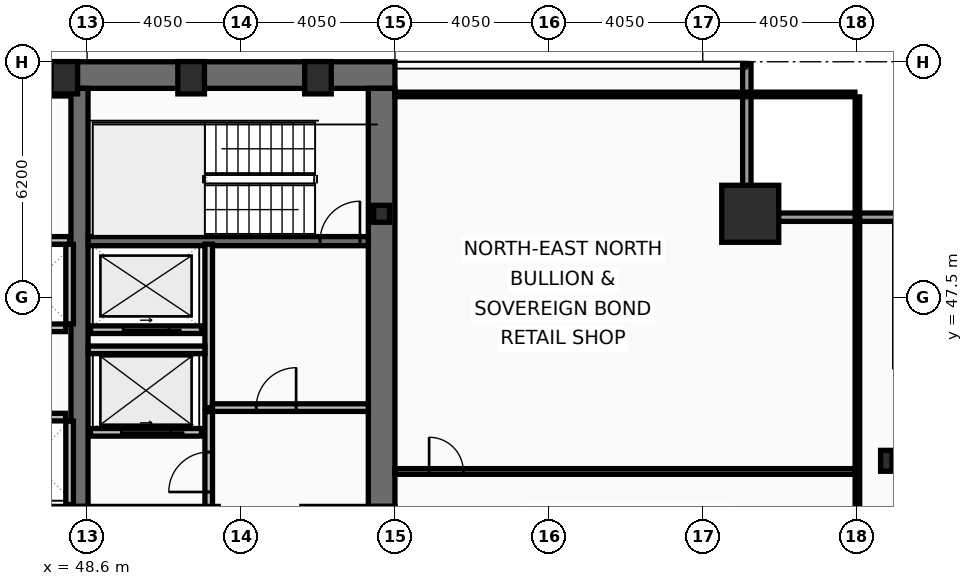
"""IFC4 building model, lengths in metres.
Left out: names, types, materials, properties, quantities, classifications, styles, units other than length and angle.
Written with IfcOpenShell. Run it as: python <this file> out.ifc"""

import sys

from ifc_helpers import new_model, si_unit, direction, frame, frame_2d, origin, origin_2d, place, context, subcontext, project, spatial, rectangle, hollow_rectangle, i_section, extrude, element, fill, save


model = new_model("IFC4")
c1 = context("Model", 3, precision=1e-05, world=origin(), true_north=direction((0.0, 1.0)))
c2 = subcontext(c1, "Body", "Model", "MODEL_VIEW")
j1 = project(units=[si_unit("LENGTHUNIT", "METRE"), si_unit("PLANEANGLEUNIT", "RADIAN")], contexts=[c1])
p1 = place(None, origin())
s1 = spatial("IfcSite", under=j1, at=p1, CompositionType="ELEMENT")
p2 = place(p1, origin())
s2 = spatial("IfcBuilding", under=s1, at=p2, CompositionType="ELEMENT")
p3 = place(p2, frame((0.0, 0.0, 125.4)))
s3 = spatial("IfcBuildingStorey", under=s2, at=p3, CompositionType="ELEMENT", Elevation=125.4)
p4 = place(p3, frame((16.2, 53.35, 0.0), z_axis=(0.0, 0.0, 1.0), x_axis=(1.0, 0.0, 0.0)))
e1 = element("IfcWall", 1, at=p4, inside=s3, PredefinedType="SHEAR", context=c2, shape_type="SweptSolid", body=[
    extrude(rectangle(XDim=40.5, YDim=0.7, at=frame_2d((20.25, 0.0))), origin(), (0.0, 0.0, 1.0), 3.44),
])
p5 = place(p3, frame((56.35, 53.0, 0.0), z_axis=(0.0, 0.0, 1.0), x_axis=(0.0, -1.0, 0.0)))
e2 = element("IfcWall", 2, at=p5, inside=s3, PredefinedType="SHEAR", context=c2, shape_type="SweptSolid", body=[
    extrude(rectangle(XDim=11.0, YDim=0.7, at=frame_2d((5.5, 0.0))), origin(), (0.0, 0.0, 1.0), 3.44),
])
p6 = place(p3, frame((48.4, 42.0, 0.0), z_axis=(0.0, 0.0, 1.0), x_axis=(0.0, 1.0, 0.0)))
e3 = element("IfcWall", 3, at=p6, inside=s3, PredefinedType="SHEAR", context=c2, shape_type="SweptSolid", body=[
    extrude(rectangle(XDim=11.0, YDim=0.45, at=frame_2d((5.5, 0.0))), origin(), (0.0, 0.0, 1.0), 3.44),
])
p7 = place(p3, frame((48.63, 48.98, 0.0), z_axis=(0.0, 0.0, 1.0), x_axis=(1.0, 0.0, 0.0)))
e4 = element("IfcWall", 4, at=p7, inside=s3, PredefinedType="SHEAR", context=c2, shape_type="SweptSolid", body=[
    extrude(rectangle(XDim=7.37, YDim=0.24, at=frame_2d((3.685, 0.0))), origin(), (0.0, 0.0, 1.0), 3.44),
])
p8 = place(p7, frame((6.1, 0.0, 0.0)))
e5 = element("IfcOpeningElement", 5, at=p8, cuts=e4, PredefinedType="OPENING", context=c2, shape_type="SweptSolid", body=[
    extrude(rectangle(XDim=1.05, YDim=2.15, at=frame_2d((0.525, 1.075))), frame((0.0, 0.13, 0.0), z_axis=(0.0, -1.0, 0.0), x_axis=(1.0, 0.0, 0.0)), (0.0, 0.0, 1.0), 0.26),
])
p9 = place(p3, frame((66.05, 49.7, 0.0), z_axis=(0.0, 0.0, 1.0), x_axis=(1.0, 0.0, 0.0)))
e6 = element("IfcColumn", 6, at=p9, inside=s3, PredefinedType="COLUMN", context=c2, shape_type="SweptSolid", body=[
    extrude(hollow_rectangle(XDim=1.5, YDim=1.5, WallThickness=0.07, at=origin_2d()), origin(), (0.0, 0.0, 1.0), 3.6),
])
for number, where, z_axis, x_axis in (
    (7, (48.0, 53.28, 0.0), (0.0, 0.0, 1.0), (1.0, 0.0, 0.0)),
    (8, (51.337, 53.28, 0.0), (0.0, 0.0, 1.0), (1.0, 0.0, 0.0)),
    (9, (54.675, 53.28, 0.0), (0.0, 0.0, 1.0), (1.0, 0.0, 0.0)),
):
    element("IfcColumn", number, at=place(p3, frame(where, z_axis=z_axis, x_axis=x_axis)), inside=s3, PredefinedType="COLUMN", context=c2, shape_type="SweptSolid", body=[
        extrude(hollow_rectangle(XDim=0.7, YDim=0.85, WallThickness=0.05, at=origin_2d()), origin(), (0.0, 0.0, 1.0), 3.6),
    ])
p10 = place(p3, frame((69.63, 43.2, 0.0), z_axis=(0.0, 0.0, 1.0), x_axis=(1.0, 0.0, 0.0)))
e10 = element("IfcColumn", 10, at=p10, inside=s3, PredefinedType="COLUMN", context=c2, shape_type="SweptSolid", body=[
    extrude(i_section(OverallWidth=0.3, OverallDepth=0.55, WebThickness=0.015, FlangeThickness=0.029, at=origin_2d()), origin(), (0.0, 0.0, 1.0), 3.6),
])
p11 = place(p3, frame((56.35, 49.7, 0.0), z_axis=(0.0, 0.0, 1.0), x_axis=(1.0, 0.0, 0.0)))
e11 = element("IfcColumn", 11, at=p11, inside=s3, PredefinedType="COLUMN", context=c2, shape_type="SweptSolid", body=[
    extrude(i_section(OverallWidth=0.416, OverallDepth=0.446, WebThickness=0.039, FlangeThickness=0.063, at=origin_2d()), origin(), (0.0, 0.0, 1.0), 3.6),
])
p12 = place(p3, frame((65.96, 53.63, 0.0), z_axis=(0.0, 0.0, 1.0), x_axis=(0.0, -1.0, 0.0)))
e12 = element("IfcWall", 12, at=p12, inside=s3, PredefinedType="SOLIDWALL", context=c2, shape_type="SweptSolid", body=[
    extrude(rectangle(XDim=3.91, YDim=0.22, at=frame_2d((1.955, 0.0))), origin(), (0.0, 0.0, 1.0), 2.83),
])
p13 = place(p3, frame((65.85, 49.61, 0.0), z_axis=(0.0, 0.0, 1.0), x_axis=(1.0, 0.0, 0.0)))
e13 = element("IfcWall", 13, at=p13, inside=s3, PredefinedType="SOLIDWALL", context=c2, shape_type="SweptSolid", body=[
    extrude(rectangle(XDim=4.22, YDim=0.22, at=frame_2d((2.11, 0.0))), origin(), (0.0, 0.0, 1.0), 2.83),
])
p14 = place(p3, frame((51.61, 43.95, 0.0), z_axis=(0.0, 0.0, 1.0), x_axis=(-1.0, 0.0, 0.0)))
e14 = element("IfcWall", 14, at=p14, inside=s3, PredefinedType="PARTITIONING", context=c2, shape_type="SweptSolid", body=[
    extrude(rectangle(XDim=2.92, YDim=0.2, at=frame_2d((1.46, 0.0))), origin(), (0.0, 0.0, 1.0), 3.44),
])
p15 = place(p14, frame((0.81, 0.0, 0.0)))
e15 = element("IfcOpeningElement", 15, at=p15, cuts=e14, PredefinedType="OPENING", context=c2, shape_type="SweptSolid", body=[
    extrude(rectangle(XDim=1.3, YDim=2.18, at=frame_2d((0.65, 1.09))), frame((0.0, 0.11, 0.0), z_axis=(0.0, -1.0, 0.0), x_axis=(1.0, 0.0, 0.0)), (0.0, 0.0, 1.0), 0.22),
])
p16 = place(p3, frame((51.61, 46.65, 0.0), z_axis=(0.0, 0.0, 1.0), x_axis=(-1.0, 0.0, 0.0)))
e16 = element("IfcWall", 16, at=p16, inside=s3, PredefinedType="PARTITIONING", context=c2, shape_type="SweptSolid", body=[
    extrude(rectangle(XDim=2.92, YDim=0.2, at=frame_2d((1.46, 0.0))), origin(), (0.0, 0.0, 1.0), 3.44),
])
p17 = place(p16, frame((0.86, 0.0, 0.0)))
e17 = element("IfcOpeningElement", 17, at=p17, cuts=e16, PredefinedType="OPENING", context=c2, shape_type="SweptSolid", body=[
    extrude(rectangle(XDim=1.2, YDim=2.18, at=frame_2d((0.6, 1.09))), frame((0.0, 0.11, 0.0), z_axis=(0.0, -1.0, 0.0), x_axis=(1.0, 0.0, 0.0)), (0.0, 0.0, 1.0), 0.22),
])
p18 = place(p3, frame((51.8, 44.6, 0.0), z_axis=(0.0, 0.0, 1.0), x_axis=(0.0, 1.0, 0.0)))
e18 = element("IfcWall", 18, at=p18, inside=s3, PredefinedType="PARTITIONING", context=c2, shape_type="SweptSolid", body=[
    extrude(rectangle(XDim=4.3, YDim=0.2, at=frame_2d((2.15, 0.0))), origin(), (0.0, 0.0, 1.0), 3.44),
])
p19 = place(p3, frame((51.9, 44.6, 0.0), z_axis=(0.0, 0.0, 1.0), x_axis=(1.0, 0.0, 0.0)))
e19 = element("IfcWall", 19, at=p19, inside=s3, PredefinedType="PARTITIONING", context=c2, shape_type="SweptSolid", body=[
    extrude(rectangle(XDim=4.1, YDim=0.2, at=frame_2d((2.05, 0.0))), origin(), (0.0, 0.0, 1.0), 3.44),
])
p20 = place(p19, frame((1.15, 0.0, 0.0)))
e20 = element("IfcOpeningElement", 20, at=p20, cuts=e19, PredefinedType="OPENING", context=c2, shape_type="SweptSolid", body=[
    extrude(rectangle(XDim=1.05, YDim=2.15, at=frame_2d((0.525, 1.075))), frame((0.0, 0.11, 0.0), z_axis=(0.0, -1.0, 0.0), x_axis=(1.0, 0.0, 0.0)), (0.0, 0.0, 1.0), 0.22),
])
p21 = place(p3, frame((48.63, 46.12, 0.0), z_axis=(0.0, 0.0, 1.0), x_axis=(1.0, 0.0, 0.0)))
e21 = element("IfcWall", 21, at=p21, inside=s3, PredefinedType="PARTITIONING", context=c2, shape_type="SweptSolid", body=[
    extrude(rectangle(XDim=3.07, YDim=0.2, at=frame_2d((1.535, 0.0))), origin(), (0.0, 0.0, 1.0), 3.44),
])
p22 = place(p3, frame((51.8, 42.0, 0.0), z_axis=(0.0, 0.0, 1.0), x_axis=(0.0, 1.0, 0.0)))
e22 = element("IfcWall", 22, at=p22, inside=s3, PredefinedType="PARTITIONING", context=c2, shape_type="SweptSolid", body=[
    extrude(rectangle(XDim=2.495, YDim=0.2, at=frame_2d((1.248, 0.0))), origin(), (0.0, 0.0, 1.0), 3.44),
])
p23 = place(p22, frame((0.38, 0.0, 0.0)))
e23 = element("IfcOpeningElement", 23, at=p23, cuts=e22, PredefinedType="OPENING", context=c2, shape_type="SweptSolid", body=[
    extrude(rectangle(XDim=1.05, YDim=2.15, at=frame_2d((0.525, 1.075))), frame((0.0, 0.11, 0.0), z_axis=(0.0, -1.0, 0.0), x_axis=(1.0, 0.0, 0.0)), (0.0, 0.0, 1.0), 0.22),
])
p24 = place(p3, frame((41.825, 46.7, 0.0), z_axis=(0.0, 0.0, 1.0), x_axis=(1.0, 0.0, 0.0)))
e24 = element("IfcWall", 24, at=p24, inside=s3, PredefinedType="PARTITIONING", context=c2, shape_type="SweptSolid", body=[
    extrude(rectangle(XDim=6.21, YDim=0.2, at=frame_2d((3.105, 0.0))), origin(), (0.0, 0.0, 1.0), 3.44),
])
p25 = place(p3, frame((48.14, 46.805, 0.0), z_axis=(0.0, 0.0, 1.0), x_axis=(0.0, 1.0, 0.0)))
e25 = element("IfcWall", 25, at=p25, inside=s3, PredefinedType="PARTITIONING", context=c2, shape_type="SweptSolid", body=[
    extrude(rectangle(XDim=2.09, YDim=0.2, at=frame_2d((1.045, 0.0))), origin(), (0.0, 0.0, 1.0), 3.44),
])
p26 = place(p3, frame((41.825, 44.35, 0.0), z_axis=(0.0, 0.0, 1.0), x_axis=(1.0, 0.0, 0.0)))
e26 = element("IfcWall", 26, at=p26, inside=s3, PredefinedType="PARTITIONING", context=c2, shape_type="SweptSolid", body=[
    extrude(rectangle(XDim=6.21, YDim=0.2, at=frame_2d((3.105, 0.0))), origin(), (0.0, 0.0, 1.0), 3.44),
])
p27 = place(p3, frame((48.14, 42.05, 0.0), z_axis=(0.0, 0.0, 1.0), x_axis=(0.0, 1.0, 0.0)))
e27 = element("IfcWall", 27, at=p27, inside=s3, PredefinedType="PARTITIONING", context=c2, shape_type="SweptSolid", body=[
    extrude(rectangle(XDim=2.195, YDim=0.2, at=frame_2d((1.098, 0.0))), origin(), (0.0, 0.0, 1.0), 3.44),
])
p28 = place(p3, frame((40.58, 52.86, 0.0), z_axis=(0.0, 0.0, 1.0), x_axis=(1.0, 0.0, 0.0)))
e28 = element("IfcWall", 28, at=p28, inside=s3, PredefinedType="PARTITIONING", context=c2, shape_type="SweptSolid", body=[
    extrude(rectangle(XDim=7.56, YDim=0.12, at=frame_2d((3.78, 0.0))), origin(), (0.0, 0.0, 1.0), 3.44),
])
p29 = place(p3, frame((40.58, 49.0, 0.0), z_axis=(0.0, 0.0, 1.0), x_axis=(1.0, 0.0, 0.0)))
e29 = element("IfcWall", 29, at=p29, inside=s3, PredefinedType="PARTITIONING", context=c2, shape_type="SweptSolid", body=[
    extrude(rectangle(XDim=7.56, YDim=0.2, at=frame_2d((3.78, 0.0))), origin(), (0.0, 0.0, 1.0), 3.44),
])
p30 = place(p29, frame((0.16, 0.0, 0.0)))
e30 = element("IfcOpeningElement", 30, at=p30, cuts=e29, PredefinedType="OPENING", context=c2, shape_type="SweptSolid", body=[
    extrude(rectangle(XDim=0.95, YDim=2.1, at=frame_2d((0.475, 1.05))), frame((0.0, 0.11, 0.0), z_axis=(0.0, -1.0, 0.0), x_axis=(1.0, 0.0, 0.0)), (0.0, 0.0, 1.0), 0.22),
])
p31 = place(p3, frame((56.7, 42.92, 0.0), z_axis=(0.0, 0.0, 1.0), x_axis=(1.0, 0.0, 0.0)))
e31 = element("IfcWall", 31, at=p31, inside=s3, PredefinedType="PARTITIONING", context=c2, shape_type="SweptSolid", body=[
    extrude(rectangle(XDim=12.105, YDim=0.15, at=frame_2d((6.052, 0.0))), origin(), (0.0, 0.0, 1.0), 2.73),
])
p32 = place(p31, frame((0.9, 0.0, 0.0)))
e32 = element("IfcOpeningElement", 32, at=p32, cuts=e31, PredefinedType="OPENING", context=c2, shape_type="SweptSolid", body=[
    extrude(rectangle(XDim=0.9, YDim=2.05, at=frame_2d((0.45, 1.025))), frame((0.0, 0.085, 0.0), z_axis=(0.0, -1.0, 0.0), x_axis=(1.0, 0.0, 0.0)), (0.0, 0.0, 1.0), 0.17),
])
p33 = place(p3, frame((68.87, 10.665, 0.0), z_axis=(0.0, 0.0, 1.0), x_axis=(0.0, 1.0, 0.0)))
e33 = element("IfcWall", 33, at=p33, inside=s3, PredefinedType="PARTITIONING", context=c2, shape_type="SweptSolid", body=[
    extrude(rectangle(XDim=42.11, YDim=0.12, at=frame_2d((21.055, 0.0))), origin(), (0.0, 0.0, 1.0), 2.73),
])
p34 = place(p3, frame((56.7, 52.84, 0.0), z_axis=(0.0, 0.0, 1.0), x_axis=(1.0, 0.0, 0.0)))
e34 = element("IfcWall", 34, at=p34, inside=s3, PredefinedType="PARTITIONING", context=c2, shape_type="SweptSolid", body=[
    extrude(rectangle(XDim=12.105, YDim=0.12, at=frame_2d((6.052, 0.0))), origin(), (0.0, 0.0, 1.0), 3.44),
])
p35 = place(p8, origin())
e35 = element("IfcDoor", 35, at=p35, inside=s3, OperationType="SINGLE_SWING_RIGHT", PredefinedType="DOOR", context=c2, shape_type="SweptSolid", body=[
    extrude(rectangle(XDim=1.05, YDim=2.15, at=frame_2d((0.525, 1.075))), frame((0.0, 0.025, 0.0), z_axis=(0.0, -1.0, 0.0), x_axis=(1.0, 0.0, 0.0)), (0.0, 0.0, 1.0), 0.05),
])
fill(e5, e35)
p36 = place(p15, origin())
e36 = element("IfcDoor", 36, at=p36, inside=s3, OperationType="SLIDING_TO_LEFT", PredefinedType="DOOR", context=c2, shape_type="SweptSolid", body=[
    extrude(rectangle(XDim=1.3, YDim=2.18, at=frame_2d((0.65, 1.09))), frame((0.0, 0.025, 0.0), z_axis=(0.0, -1.0, 0.0), x_axis=(1.0, 0.0, 0.0)), (0.0, 0.0, 1.0), 0.05),
])
fill(e15, e36)
p37 = place(p17, origin())
e37 = element("IfcDoor", 37, at=p37, inside=s3, OperationType="SLIDING_TO_LEFT", PredefinedType="DOOR", context=c2, shape_type="SweptSolid", body=[
    extrude(rectangle(XDim=1.2, YDim=2.18, at=frame_2d((0.6, 1.09))), frame((0.0, 0.025, 0.0), z_axis=(0.0, -1.0, 0.0), x_axis=(1.0, 0.0, 0.0)), (0.0, 0.0, 1.0), 0.05),
])
fill(e17, e37)
p38 = place(p20, origin())
e38 = element("IfcDoor", 38, at=p38, inside=s3, OperationType="SINGLE_SWING_RIGHT", PredefinedType="DOOR", context=c2, shape_type="SweptSolid", body=[
    extrude(rectangle(XDim=1.05, YDim=2.15, at=frame_2d((0.525, 1.075))), frame((0.0, 0.025, 0.0), z_axis=(0.0, -1.0, 0.0), x_axis=(1.0, 0.0, 0.0)), (0.0, 0.0, 1.0), 0.05),
])
fill(e20, e38)
p39 = place(p23, origin())
e39 = element("IfcDoor", 39, at=p39, inside=s3, OperationType="SINGLE_SWING_LEFT", PredefinedType="DOOR", context=c2, shape_type="SweptSolid", body=[
    extrude(rectangle(XDim=1.05, YDim=2.15, at=frame_2d((0.525, 1.075))), frame((0.0, 0.025, 0.0), z_axis=(0.0, -1.0, 0.0), x_axis=(1.0, 0.0, 0.0)), (0.0, 0.0, 1.0), 0.05),
])
fill(e23, e39)
p40 = place(p32, origin())
e40 = element("IfcDoor", 40, at=p40, inside=s3, OperationType="SINGLE_SWING_LEFT", PredefinedType="DOOR", context=c2, shape_type="SweptSolid", body=[
    extrude(rectangle(XDim=0.9, YDim=2.05, at=frame_2d((0.45, 1.025))), frame((0.0, 0.025, 0.0), z_axis=(0.0, -1.0, 0.0), x_axis=(1.0, 0.0, 0.0)), (0.0, 0.0, 1.0), 0.05),
])
fill(e32, e40)
save(model, sys.argv[1])
